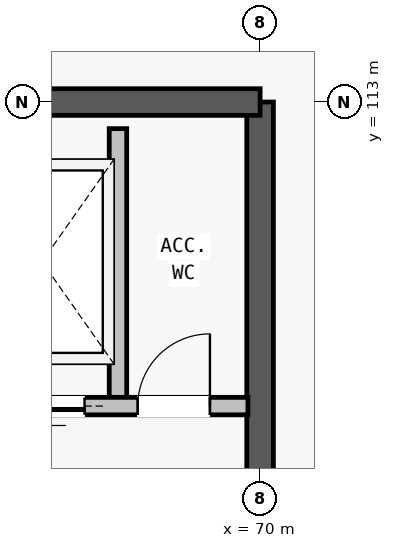
"""IFC4 building model, lengths in metres.
Left out: names, types, materials, properties, quantities, classifications, styles, units other than length and angle.
Written with IfcOpenShell. Run it as: python <this file> out.ifc"""

import sys

from ifc_helpers import new_model, si_unit, direction, frame, frame_2d, origin, place, context, subcontext, project, spatial, rectangle, extrude, element, fill, save


model = new_model("IFC4")
c1 = context("Model", 3, precision=1e-05, world=origin(), true_north=direction((0.0, 1.0)))
c2 = subcontext(c1, "Body", "Model", "MODEL_VIEW")
j1 = project(units=[si_unit("LENGTHUNIT", "METRE"), si_unit("PLANEANGLEUNIT", "RADIAN")], contexts=[c1])
p1 = place(None, origin())
s1 = spatial("IfcSite", under=j1, at=p1, CompositionType="ELEMENT")
p2 = place(p1, origin())
s2 = spatial("IfcBuilding", under=s1, at=p2, CompositionType="ELEMENT")
p3 = place(p2, frame((0.0, 0.0, 9.5)))
s3 = spatial("IfcBuildingStorey", under=s2, at=p3, CompositionType="ELEMENT", Elevation=9.5)
p4 = place(p3, frame((70.0, 104.0, 0.0), z_axis=(0.0, 0.0, 1.0), x_axis=(0.0, 1.0, 0.0)))
e1 = element("IfcWall", 1, at=p4, inside=s3, PredefinedType="SHEAR", context=c2, shape_type="SweptSolid", body=[
    extrude(rectangle(XDim=9.0, YDim=0.35, at=frame_2d((4.5, 0.0))), origin(), (0.0, 0.0, 1.0), 3.62),
])
p5 = place(p4, frame((1.4, 0.0, 0.0)))
e2 = element("IfcOpeningElement", 2, at=p5, cuts=e1, PredefinedType="OPENING", context=c2, shape_type="SweptSolid", body=[
    extrude(rectangle(XDim=1.9, YDim=2.3, at=frame_2d((0.95, 1.15))), frame((0.0, 0.185, 0.0), z_axis=(0.0, -1.0, 0.0), x_axis=(1.0, 0.0, 0.0)), (0.0, 0.0, 1.0), 0.37),
])
p6 = place(p3, frame((70.0, 113.0, 0.0), z_axis=(0.0, 0.0, 1.0), x_axis=(-1.0, 0.0, 0.0)))
e3 = element("IfcWall", 3, at=p6, inside=s3, PredefinedType="SHEAR", context=c2, shape_type="SweptSolid", body=[
    extrude(rectangle(XDim=8.0, YDim=0.35, at=frame_2d((4.0, 0.0))), origin(), (0.0, 0.0, 1.0), 3.62),
])
p7 = place(p3, frame((68.13, 109.0, 0.0), z_axis=(0.0, 0.0, 1.0), x_axis=(0.0, 1.0, 0.0)))
e4 = element("IfcWall", 4, at=p7, inside=s3, PredefinedType="PARTITIONING", context=c2, shape_type="SweptSolid", body=[
    extrude(rectangle(XDim=3.65, YDim=0.23, at=frame_2d((1.825, 0.0))), origin(), (0.0, 0.0, 1.0), 2.48),
])
p8 = place(p3, frame((66.21, 109.0, 0.0), z_axis=(0.0, 0.0, 1.0), x_axis=(1.0, 0.0, 0.0)))
e5 = element("IfcWall", 5, at=p8, inside=s3, PredefinedType="PARTITIONING", context=c2, shape_type="SweptSolid", body=[
    extrude(rectangle(XDim=3.63, YDim=0.23, at=frame_2d((1.815, 0.0))), origin(), (0.0, 0.0, 1.0), 2.48),
])
p9 = place(p8, frame((0.38, 0.0, 0.0)))
e6 = element("IfcOpeningElement", 6, at=p9, cuts=e5, PredefinedType="OPENING", context=c2, shape_type="SweptSolid", body=[
    extrude(rectangle(XDim=1.1, YDim=2.15, at=frame_2d((0.55, 1.075))), frame((0.0, 0.125, 0.0), z_axis=(0.0, -1.0, 0.0), x_axis=(1.0, 0.0, 0.0)), (0.0, 0.0, 1.0), 0.25),
])
p10 = place(p8, frame((2.18, 0.0, 0.0)))
e7 = element("IfcOpeningElement", 7, at=p10, cuts=e5, PredefinedType="OPENING", context=c2, shape_type="SweptSolid", body=[
    extrude(rectangle(XDim=0.95, YDim=2.1, at=frame_2d((0.475, 1.05))), frame((0.0, 0.125, 0.0), z_axis=(0.0, -1.0, 0.0), x_axis=(1.0, 0.0, 0.0)), (0.0, 0.0, 1.0), 0.25),
])
p11 = place(p9, origin())
e8 = element("IfcDoor", 8, at=p11, inside=s3, OperationType="SLIDING_TO_LEFT", PredefinedType="DOOR", context=c2, shape_type="SweptSolid", body=[
    extrude(rectangle(XDim=1.1, YDim=2.15, at=frame_2d((0.55, 1.075))), frame((0.0, 0.025, 0.0), z_axis=(0.0, -1.0, 0.0), x_axis=(1.0, 0.0, 0.0)), (0.0, 0.0, 1.0), 0.05),
])
fill(e6, e8)
p12 = place(p10, origin())
e9 = element("IfcDoor", 9, at=p12, inside=s3, OperationType="SINGLE_SWING_RIGHT", PredefinedType="DOOR", context=c2, shape_type="SweptSolid", body=[
    extrude(rectangle(XDim=0.95, YDim=2.1, at=frame_2d((0.475, 1.05))), frame((0.0, 0.025, 0.0), z_axis=(0.0, -1.0, 0.0), x_axis=(1.0, 0.0, 0.0)), (0.0, 0.0, 1.0), 0.05),
])
fill(e7, e9)
save(model, sys.argv[1])
